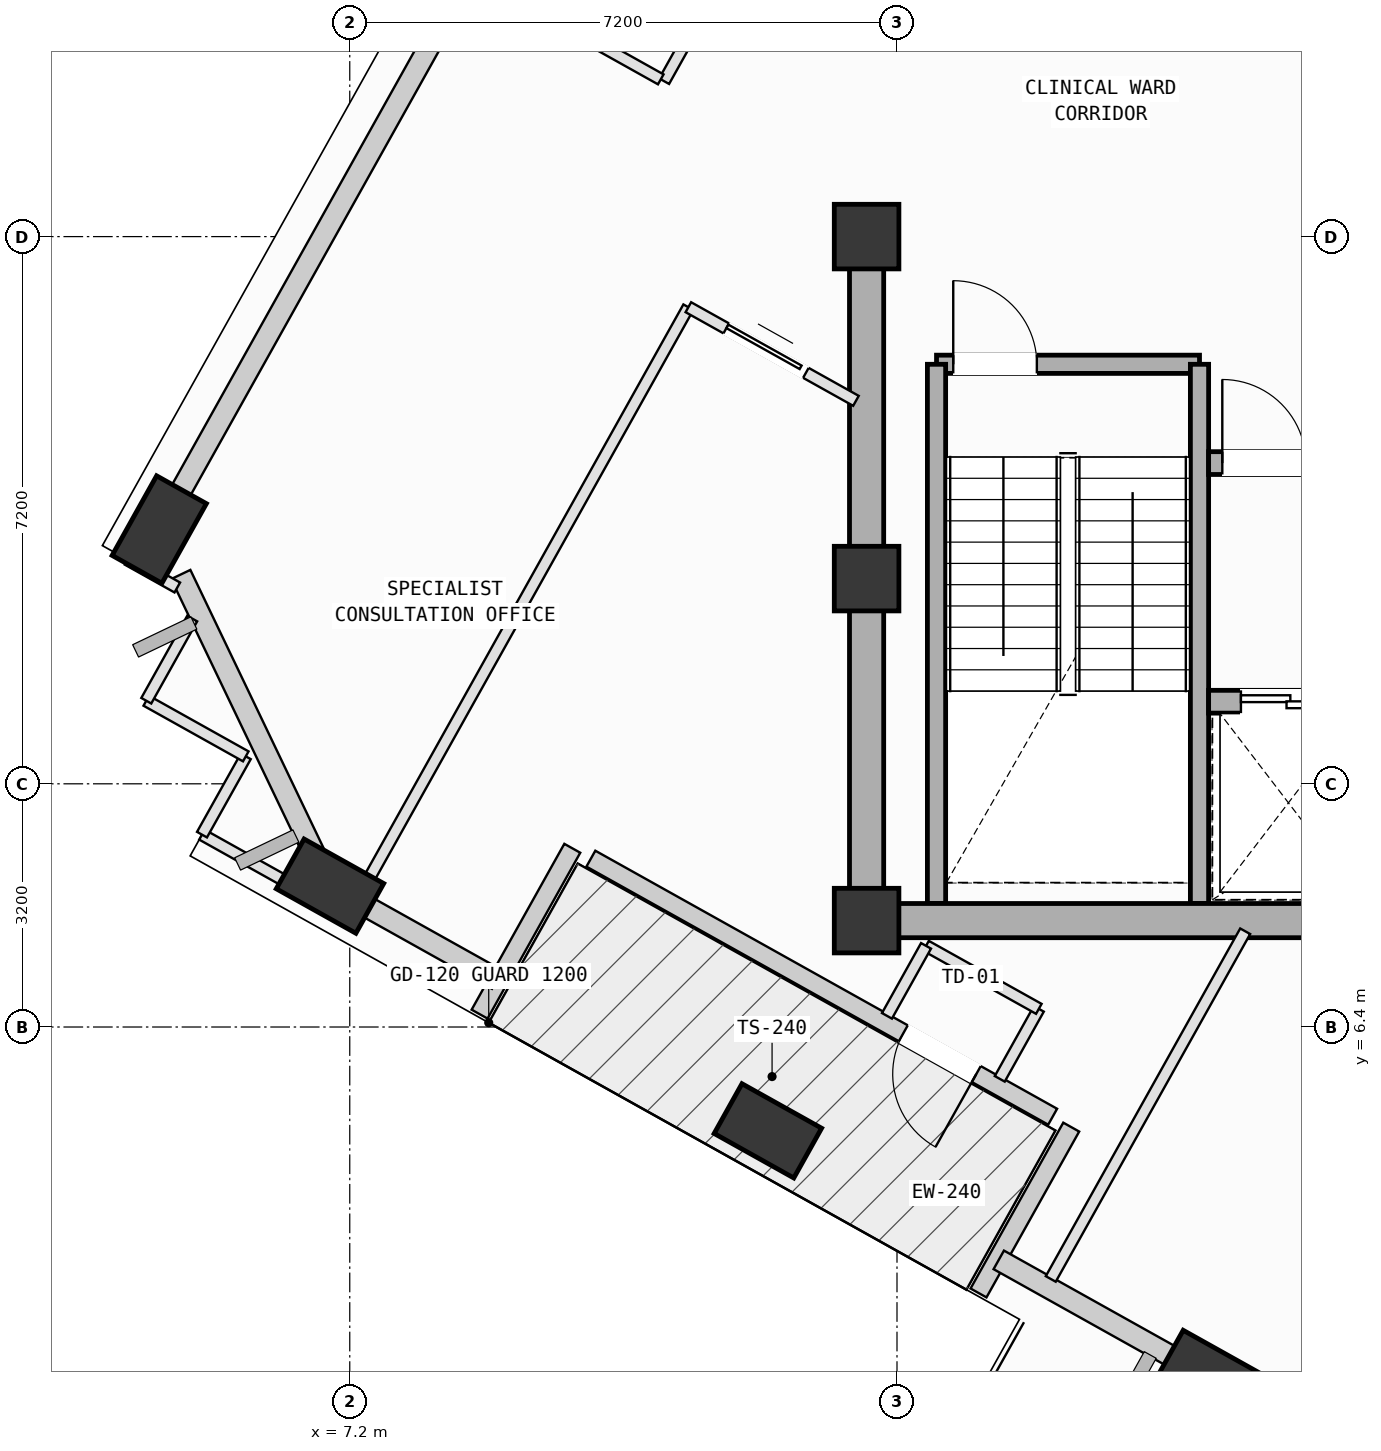
"""IFC4 building model, lengths in metres.
Left out: names, types, materials, properties, quantities, classifications, styles, units other than length and angle.
Written with IfcOpenShell. Run it as: python <this file> out.ifc"""

import sys

from ifc_helpers import new_model, si_unit, direction, frame, frame_2d, origin, origin_2d, place, context, subcontext, project, spatial, rectangle, extrude, element, fill, save


model = new_model("IFC4")
c1 = context("Model", 3, precision=1e-05, world=origin(), true_north=direction((0.0, 1.0)))
c2 = subcontext(c1, "Body", "Model", "MODEL_VIEW")
j1 = project(units=[si_unit("LENGTHUNIT", "METRE"), si_unit("PLANEANGLEUNIT", "RADIAN")], contexts=[c1])
p1 = place(None, origin())
s1 = spatial("IfcSite", under=j1, at=p1, CompositionType="ELEMENT")
p2 = place(p1, origin())
s2 = spatial("IfcBuilding", under=s1, at=p2, CompositionType="ELEMENT")
p3 = place(p2, frame((0.0, 0.0, 284.6)))
s3 = spatial("IfcBuildingStorey", under=s2, at=p3, CompositionType="ELEMENT", Elevation=284.6)
for number, where, z_axis, x_axis in (
    (1, (14.0, 7.8, 0.0), (0.0, 0.0, 1.0), (1.0, 0.0, 0.0)),
    (2, (14.0, 12.3, 0.0), (0.0, 0.0, 1.0), (1.0, 0.0, 0.0)),
    (3, (14.0, 16.8, 0.0), (0.0, 0.0, 1.0), (1.0, 0.0, 0.0)),
):
    element("IfcColumn", number, at=place(p3, frame(where, z_axis=z_axis, x_axis=x_axis)), inside=s3, PredefinedType="COLUMN", context=c2, shape_type="SweptSolid", body=[
        extrude(rectangle(XDim=0.85, YDim=0.85, at=origin_2d()), origin(), (0.0, 0.0, 1.0), 4.0),
    ])
p4 = place(p3, frame((8.694, 20.104, 0.002), z_axis=(0.020171272546, -0.102496797545, 0.994528796092), x_axis=(0.311043208592, 0.946011043433, 0.091187872504)))
e4 = element("IfcColumn", 4, at=p4, inside=s3, PredefinedType="COLUMN", context=c2, shape_type="SweptSolid", body=[
    extrude(rectangle(XDim=1.2, YDim=0.75, at=origin_2d()), origin(), (0.0, 0.0, 1.0), 4.018),
])
p5 = place(p3, frame((4.694, 12.946, 0.002), z_axis=(0.049679766232, -0.118443832908, 0.991717187142), x_axis=(0.115046064664, 0.987012557907, 0.112118747491)))
e5 = element("IfcColumn", 5, at=p5, inside=s3, PredefinedType="COLUMN", context=c2, shape_type="SweptSolid", body=[
    extrude(rectangle(XDim=1.2, YDim=0.75, at=origin_2d()), origin(), (0.0, 0.0, 1.0), 4.03),
])
p6 = place(p3, frame((6.94, 8.254, 0.002), z_axis=(0.068940682783, -0.109045016704, 0.991643265791), x_axis=(-0.996356169591, -0.057559371767, 0.062938875424)))
e6 = element("IfcColumn", 6, at=p6, inside=s3, PredefinedType="COLUMN", context=c2, shape_type="SweptSolid", body=[
    extrude(rectangle(XDim=1.2, YDim=0.75, at=origin_2d()), origin(), (0.0, 0.0, 1.0), 4.03),
])
p7 = place(p3, frame((12.701, 5.034, 0.002), z_axis=(0.082074734998, -0.085350445042, 0.99296477249), x_axis=(-0.964981086135, -0.255879690431, 0.057767529177)))
e7 = element("IfcColumn", 7, at=p7, inside=s3, PredefinedType="COLUMN", context=c2, shape_type="SweptSolid", body=[
    extrude(rectangle(XDim=1.2, YDim=0.75, at=origin_2d()), origin(), (0.0, 0.0, 1.0), 4.025),
])
p8 = place(p3, frame((18.506, 1.79, 0.002), z_axis=(0.095234780656, -0.061365432278, 0.993561583534), x_axis=(-0.88027518793, -0.471233151093, 0.055271247731)))
e8 = element("IfcColumn", 8, at=p8, inside=s3, PredefinedType="COLUMN", context=c2, shape_type="SweptSolid", body=[
    extrude(rectangle(XDim=1.2, YDim=0.75, at=origin_2d()), origin(), (0.0, 0.0, 1.0), 4.022),
])
p9 = place(p3, frame((16.448, 5.219, 0.0), z_axis=(0.0, 0.0, 1.0), x_axis=(-0.872926787091, 0.487851231811, 0.0)))
e9 = element("IfcWall", 9, at=p9, inside=s3, PredefinedType="SOLIDWALL", context=c2, shape_type="SweptSolid", body=[
    extrude(rectangle(XDim=6.96, YDim=0.24, at=frame_2d((3.48, 0.0))), origin(), (0.0, 0.0, 1.0), 3.265),
])
p10 = place(p9, frame((1.151, 0.0, 0.0)))
e10 = element("IfcOpeningElement", 10, at=p10, cuts=e9, PredefinedType="OPENING", context=c2, shape_type="SweptSolid", body=[
    extrude(rectangle(XDim=1.1, YDim=2.15, at=frame_2d((0.55, 1.075))), frame((0.0, 0.13, 0.0), z_axis=(0.0, -1.0, 0.0), x_axis=(1.0, 0.0, 0.0)), (0.0, 0.0, 1.0), 0.26),
])
for number, where, z_axis, x_axis in (
    (11, (15.473, 2.901, 0.0), (0.0, 0.0, 1.0), (0.488, 0.873, 0.0)),
    (12, (10.128, 8.752, 0.0), (0.0, 0.0, 1.0), (-0.488, -0.873, 0.0)),
):
    element("IfcWall", number, at=place(p3, frame(where, z_axis=z_axis, x_axis=x_axis)), inside=s3, PredefinedType="SOLIDWALL", context=c2, shape_type="SweptSolid", body=[
        extrude(rectangle(XDim=2.5, YDim=0.24, at=frame_2d((1.25, 0.0))), origin(), (0.0, 0.0, 1.0), 3.265),
    ])
p11 = place(p3, frame((4.782, 13.104, 0.0), z_axis=(0.0, 0.0, 1.0), x_axis=(0.487879111407, 0.87291120548, 0.0)))
e13 = element("IfcWall", 13, at=p11, inside=s3, PredefinedType="SOLIDWALL", context=c2, shape_type="SweptSolid", body=[
    extrude(rectangle(XDim=7.485, YDim=0.28, at=frame_2d((3.742, 0.0))), origin(), (0.0, 0.0, 1.0), 3.265),
])
p12 = place(p3, frame((6.88, 8.378, 0.0), z_axis=(0.0, 0.0, 1.0), x_axis=(-0.431794518494, 0.90197200278, 0.0)))
e14 = element("IfcWall", 14, at=p12, inside=s3, PredefinedType="SOLIDWALL", context=c2, shape_type="SweptSolid", body=[
    extrude(rectangle(XDim=4.408, YDim=0.28, at=frame_2d((2.204, 0.0))), origin(), (0.0, 0.0, 1.0), 3.265),
])
p13 = place(p3, frame((9.14, 7.024, 0.0), z_axis=(0.0, 0.0, 1.0), x_axis=(-0.872945079881, 0.487818498534, 0.0)))
e15 = element("IfcWall", 15, at=p13, inside=s3, PredefinedType="SOLIDWALL", context=c2, shape_type="SweptSolid", body=[
    extrude(rectangle(XDim=1.914, YDim=0.28, at=frame_2d((0.957, 0.0))), origin(), (0.0, 0.0, 1.0), 3.245),
])
p14 = place(p3, frame((18.358, 1.872, 0.0), z_axis=(0.0, 0.0, 1.0), x_axis=(-0.872891499108, 0.487914368291, 0.0)))
e16 = element("IfcWall", 16, at=p14, inside=s3, PredefinedType="SOLIDWALL", context=c2, shape_type="SweptSolid", body=[
    extrude(rectangle(XDim=3.0, YDim=0.28, at=frame_2d((1.5, 0.0))), origin(), (0.0, 0.0, 1.0), 3.245),
])
p15 = place(p3, frame((14.92, 15.12, 0.0), z_axis=(0.0, 0.0, 1.0), x_axis=(1.0, 0.0, 0.0)))
e17 = element("IfcWall", 17, at=p15, inside=s3, PredefinedType="SOLIDWALL", context=c2, shape_type="SweptSolid", body=[
    extrude(rectangle(XDim=3.46, YDim=0.24, at=frame_2d((1.73, 0.0))), origin(), (0.0, 0.0, 1.0), 3.78),
])
p16 = place(p15, frame((0.22, 0.0, 0.0)))
e18 = element("IfcOpeningElement", 18, at=p16, cuts=e17, PredefinedType="OPENING", context=c2, shape_type="SweptSolid", body=[
    extrude(rectangle(XDim=1.1, YDim=2.15, at=frame_2d((0.55, 1.075))), frame((0.0, 0.13, 0.0), z_axis=(0.0, -1.0, 0.0), x_axis=(1.0, 0.0, 0.0)), (0.0, 0.0, 1.0), 0.26),
])
for number, where, z_axis, x_axis in (
    (19, (18.38, 15.12, 0.0), (0.0, 0.0, 1.0), (0.0, -1.0, 0.0)),
    (20, (14.92, 8.025, 0.0), (0.0, 0.0, 1.0), (0.0, 1.0, 0.0)),
):
    element("IfcWall", number, at=place(p3, frame(where, z_axis=z_axis, x_axis=x_axis)), inside=s3, PredefinedType="SOLIDWALL", context=c2, shape_type="SweptSolid", body=[
        extrude(rectangle(XDim=7.095, YDim=0.24, at=frame_2d((3.548, 0.0))), origin(), (0.0, 0.0, 1.0), 3.78),
    ])
p17 = place(p3, frame((14.0, 7.8, 0.0), z_axis=(0.0, 0.0, 1.0), x_axis=(1.0, 0.0, 0.0)))
e21 = element("IfcWall", 21, at=p17, inside=s3, PredefinedType="SHEAR", context=c2, shape_type="SweptSolid", body=[
    extrude(rectangle(XDim=10.8, YDim=0.45, at=frame_2d((5.4, 0.0))), origin(), (0.0, 0.0, 1.0), 3.78),
])
p18 = place(p3, frame((14.0, 16.8, 0.0), z_axis=(0.0, 0.0, 1.0), x_axis=(0.0, -1.0, 0.0)))
e22 = element("IfcWall", 22, at=p18, inside=s3, PredefinedType="SHEAR", context=c2, shape_type="SweptSolid", body=[
    extrude(rectangle(XDim=9.0, YDim=0.45, at=frame_2d((4.5, 0.0))), origin(), (0.0, 0.0, 1.0), 3.78),
])
p19 = place(p3, frame((18.5, 10.68, 0.0), z_axis=(0.0, 0.0, 1.0), x_axis=(1.0, 0.0, 0.0)))
e23 = element("IfcWall", 23, at=p19, inside=s3, PredefinedType="SOLIDWALL", context=c2, shape_type="SweptSolid", body=[
    extrude(rectangle(XDim=5.3, YDim=0.3, at=frame_2d((2.65, 0.0))), origin(), (0.0, 0.0, 1.0), 3.78),
])
p20 = place(p19, frame((4.22, 0.0, 0.0)))
e24 = element("IfcOpeningElement", 24, at=p20, cuts=e23, PredefinedType="OPENING", context=c2, shape_type="SweptSolid", body=[
    extrude(rectangle(XDim=0.86, YDim=2.06, at=frame_2d((0.43, 1.03))), frame((0.0, 0.16, 0.0), z_axis=(0.0, -1.0, 0.0), x_axis=(1.0, 0.0, 0.0)), (0.0, 0.0, 1.0), 0.32),
])
p21 = place(p19, frame((0.425, 0.0, 0.0)))
e25 = element("IfcOpeningElement", 25, at=p21, cuts=e23, PredefinedType="OPENING", context=c2, shape_type="SweptSolid", body=[
    extrude(rectangle(XDim=1.25, YDim=2.18, at=frame_2d((0.625, 1.09))), frame((0.0, 0.16, 0.0), z_axis=(0.0, -1.0, 0.0), x_axis=(1.0, 0.0, 0.0)), (0.0, 0.0, 1.0), 0.32),
])
p22 = place(p19, frame((2.525, 0.0, 0.0)))
e26 = element("IfcOpeningElement", 26, at=p22, cuts=e23, PredefinedType="OPENING", context=c2, shape_type="SweptSolid", body=[
    extrude(rectangle(XDim=1.25, YDim=2.18, at=frame_2d((0.625, 1.09))), frame((0.0, 0.16, 0.0), z_axis=(0.0, -1.0, 0.0), x_axis=(1.0, 0.0, 0.0)), (0.0, 0.0, 1.0), 0.32),
])
p23 = place(p3, frame((18.5, 13.82, 0.0), z_axis=(0.0, 0.0, 1.0), x_axis=(1.0, 0.0, 0.0)))
e27 = element("IfcWall", 27, at=p23, inside=s3, PredefinedType="SOLIDWALL", context=c2, shape_type="SweptSolid", body=[
    extrude(rectangle(XDim=5.3, YDim=0.3, at=frame_2d((2.65, 0.0))), origin(), (0.0, 0.0, 1.0), 3.78),
])
p24 = place(p23, frame((0.18, 0.0, 0.0)))
e28 = element("IfcOpeningElement", 28, at=p24, cuts=e27, PredefinedType="OPENING", context=c2, shape_type="SweptSolid", body=[
    extrude(rectangle(XDim=1.1, YDim=2.15, at=frame_2d((0.55, 1.075))), frame((0.0, 0.16, 0.0), z_axis=(0.0, -1.0, 0.0), x_axis=(1.0, 0.0, 0.0)), (0.0, 0.0, 1.0), 0.32),
])
p25 = place(p3, frame((16.423, 3.085, 0.0), z_axis=(0.0, 0.0, 1.0), x_axis=(0.488006126724, 0.872840203176, 0.0)))
e29 = element("IfcWall", 29, at=p25, inside=s3, PredefinedType="PARTITIONING", context=c2, shape_type="SweptSolid", body=[
    extrude(rectangle(XDim=5.241, YDim=0.15, at=frame_2d((2.621, 0.0))), origin(), (0.0, 0.0, 1.0), 3.78),
])
p26 = place(p3, frame((15.752, 5.718, 0.0), z_axis=(0.0, 0.0, 1.0), x_axis=(0.487489290316, 0.87312896632, 0.0)))
e30 = element("IfcWall", 30, at=p26, inside=s3, PredefinedType="PARTITIONING", context=c2, shape_type="SweptSolid", body=[
    extrude(rectangle(XDim=1.055, YDim=0.15, at=frame_2d((0.527, 0.0))), origin(), (0.0, 0.0, 1.0), 3.78),
])
p27 = place(p3, frame((16.266, 6.639, 0.0), z_axis=(0.0, 0.0, 1.0), x_axis=(-0.873010025358, 0.487702261246, 0.0)))
e31 = element("IfcWall", 31, at=p27, inside=s3, PredefinedType="PARTITIONING", context=c2, shape_type="SweptSolid", body=[
    extrude(rectangle(XDim=1.7, YDim=0.15, at=frame_2d((0.85, 0.0))), origin(), (0.0, 0.0, 1.0), 3.78),
])
p28 = place(p3, frame((14.782, 7.468, 0.0), z_axis=(0.0, 0.0, 1.0), x_axis=(-0.487312793444, -0.87322748545, 0.0)))
e32 = element("IfcWall", 32, at=p28, inside=s3, PredefinedType="PARTITIONING", context=c2, shape_type="SweptSolid", body=[
    extrude(rectangle(XDim=1.055, YDim=0.15, at=frame_2d((0.527, 0.0))), origin(), (0.0, 0.0, 1.0), 3.78),
])
p29 = place(p3, frame((7.177, 7.858, 0.0), z_axis=(0.0, 0.0, 1.0), x_axis=(0.487827318566, 0.872940151019, 0.0)))
e33 = element("IfcWall", 33, at=p29, inside=s3, PredefinedType="PARTITIONING", context=c2, shape_type="SweptSolid", body=[
    extrude(rectangle(XDim=9.179, YDim=0.15, at=frame_2d((4.59, 0.0))), origin(), (0.0, 0.0, 1.0), 3.415),
])
p30 = place(p3, frame((11.655, 15.871, 0.0), z_axis=(0.0, 0.0, 1.0), x_axis=(0.872955587188, -0.487799695365, 0.0)))
e34 = element("IfcWall", 34, at=p30, inside=s3, PredefinedType="PARTITIONING", context=c2, shape_type="SweptSolid", body=[
    extrude(rectangle(XDim=2.526, YDim=0.15, at=frame_2d((1.263, 0.0))), origin(), (0.0, 0.0, 1.0), 3.78),
])
p31 = place(p30, frame((0.571, 0.0, 0.0)))
e35 = element("IfcOpeningElement", 35, at=p31, cuts=e34, PredefinedType="OPENING", context=c2, shape_type="SweptSolid", body=[
    extrude(rectangle(XDim=1.2, YDim=2.15, at=frame_2d((0.6, 1.075))), frame((0.0, 0.085, 0.0), z_axis=(0.0, -1.0, 0.0), x_axis=(1.0, 0.0, 0.0)), (0.0, 0.0, 1.0), 0.17),
])
p32 = place(p3, frame((4.931, 12.183, 0.0), z_axis=(0.0, 0.0, 1.0), x_axis=(-0.872600457628, 0.488434684833, 0.0)))
e36 = element("IfcWall", 36, at=p32, inside=s3, PredefinedType="PARTITIONING", context=c2, shape_type="SweptSolid", body=[
    extrude(rectangle(XDim=0.749, YDim=0.15, at=frame_2d((0.375, 0.0))), origin(), (0.0, 0.0, 1.0), 3.78),
])
p33 = place(p3, frame((4.277, 12.549, 0.0), z_axis=(0.0, 0.0, 1.0), x_axis=(0.488277898247, 0.872688199808, 0.0)))
e37 = element("IfcWall", 37, at=p33, inside=s3, PredefinedType="PARTITIONING", context=c2, shape_type="SweptSolid", body=[
    extrude(rectangle(XDim=0.731, YDim=0.15, at=frame_2d((0.365, 0.0))), origin(), (0.0, 0.0, 1.0), 3.78),
])
p34 = place(p3, frame((7.037, 7.936, 0.0), z_axis=(0.0, 0.0, 1.0), x_axis=(-0.87302590864, 0.487673828336, 0.0)))
e38 = element("IfcWall", 38, at=p34, inside=s3, PredefinedType="PARTITIONING", context=c2, shape_type="SweptSolid", body=[
    extrude(rectangle(XDim=2.04, YDim=0.15, at=frame_2d((1.02, 0.0))), origin(), (0.0, 0.0, 1.0), 3.245),
])
p35 = place(p3, frame((5.256, 8.931, 0.0), z_axis=(0.0, 0.0, 1.0), x_axis=(0.48802999663, 0.872826857051, 0.0)))
e39 = element("IfcWall", 39, at=p35, inside=s3, PredefinedType="PARTITIONING", context=c2, shape_type="SweptSolid", body=[
    extrude(rectangle(XDim=1.18, YDim=0.15, at=frame_2d((0.59, 0.0))), origin(), (0.0, 0.0, 1.0), 3.78),
])
p36 = place(p3, frame((5.832, 9.961, 0.0), z_axis=(0.0, 0.0, 1.0), x_axis=(-0.872764023817, 0.488142354985, 0.0)))
e40 = element("IfcWall", 40, at=p36, inside=s3, PredefinedType="PARTITIONING", context=c2, shape_type="SweptSolid", body=[
    extrude(rectangle(XDim=1.5, YDim=0.15, at=frame_2d((0.75, 0.0))), origin(), (0.0, 0.0, 1.0), 3.78),
])
p37 = place(p3, frame((4.523, 10.693, 0.0), z_axis=(0.0, 0.0, 1.0), x_axis=(0.487834615899, 0.872936072992, 0.0)))
e41 = element("IfcWall", 41, at=p37, inside=s3, PredefinedType="PARTITIONING", context=c2, shape_type="SweptSolid", body=[
    extrude(rectangle(XDim=1.238, YDim=0.15, at=frame_2d((0.619, 0.0))), origin(), (0.0, 0.0, 1.0), 3.78),
])
p38 = place(p3, frame((12.168, 20.334, 0.0), z_axis=(0.0, 0.0, 1.0), x_axis=(-0.487792485764, -0.872959615808, 0.0)))
e42 = element("IfcWall", 42, at=p38, inside=s3, PredefinedType="PARTITIONING", context=c2, shape_type="SweptSolid", body=[
    extrude(rectangle(XDim=1.706, YDim=0.15, at=frame_2d((0.853, 0.0))), origin(), (0.0, 0.0, 1.0), 3.78),
])
p39 = place(p3, frame((11.292, 18.869, 0.0), z_axis=(0.0, 0.0, 1.0), x_axis=(-0.87277157088, 0.488128861125, 0.0)))
e43 = element("IfcWall", 43, at=p39, inside=s3, PredefinedType="PARTITIONING", context=c2, shape_type="SweptSolid", body=[
    extrude(rectangle(XDim=2.758, YDim=0.15, at=frame_2d((1.379, 0.0))), origin(), (0.0, 0.0, 1.0), 3.78),
])
p40 = place(p10, origin())
e44 = element("IfcDoor", 44, at=p40, inside=s3, OperationType="SINGLE_SWING_LEFT", PredefinedType="DOOR", context=c2, shape_type="SweptSolid", body=[
    extrude(rectangle(XDim=1.1, YDim=2.15, at=frame_2d((0.55, 1.075))), frame((0.0, 0.025, 0.0), z_axis=(0.0, -1.0, 0.0), x_axis=(1.0, 0.0, 0.0)), (0.0, 0.0, 1.0), 0.05),
])
fill(e10, e44)
p41 = place(p16, origin())
e45 = element("IfcDoor", 45, at=p41, inside=s3, OperationType="SINGLE_SWING_LEFT", PredefinedType="DOOR", context=c2, shape_type="SweptSolid", body=[
    extrude(rectangle(XDim=1.1, YDim=2.15, at=frame_2d((0.55, 1.075))), frame((0.0, 0.025, 0.0), z_axis=(0.0, -1.0, 0.0), x_axis=(1.0, 0.0, 0.0)), (0.0, 0.0, 1.0), 0.05),
])
fill(e18, e45)
p42 = place(p24, origin())
e46 = element("IfcDoor", 46, at=p42, inside=s3, OperationType="SINGLE_SWING_LEFT", PredefinedType="DOOR", context=c2, shape_type="SweptSolid", body=[
    extrude(rectangle(XDim=1.1, YDim=2.15, at=frame_2d((0.55, 1.075))), frame((0.0, 0.025, 0.0), z_axis=(0.0, -1.0, 0.0), x_axis=(1.0, 0.0, 0.0)), (0.0, 0.0, 1.0), 0.05),
])
fill(e28, e46)
p43 = place(p21, origin())
e47 = element("IfcDoor", 47, at=p43, inside=s3, OperationType="DOUBLE_DOOR_SLIDING", PredefinedType="DOOR", context=c2, shape_type="SweptSolid", body=[
    extrude(rectangle(XDim=1.25, YDim=2.18, at=frame_2d((0.625, 1.09))), frame((0.0, 0.025, 0.0), z_axis=(0.0, -1.0, 0.0), x_axis=(1.0, 0.0, 0.0)), (0.0, 0.0, 1.0), 0.05),
])
fill(e25, e47)
p44 = place(p31, origin())
e48 = element("IfcDoor", 48, at=p44, inside=s3, OperationType="SLIDING_TO_LEFT", PredefinedType="DOOR", context=c2, shape_type="SweptSolid", body=[
    extrude(rectangle(XDim=1.2, YDim=2.15, at=frame_2d((0.6, 1.075))), frame((0.0, 0.025, 0.0), z_axis=(0.0, -1.0, 0.0), x_axis=(1.0, 0.0, 0.0)), (0.0, 0.0, 1.0), 0.05),
])
fill(e35, e48)
save(model, sys.argv[1])
